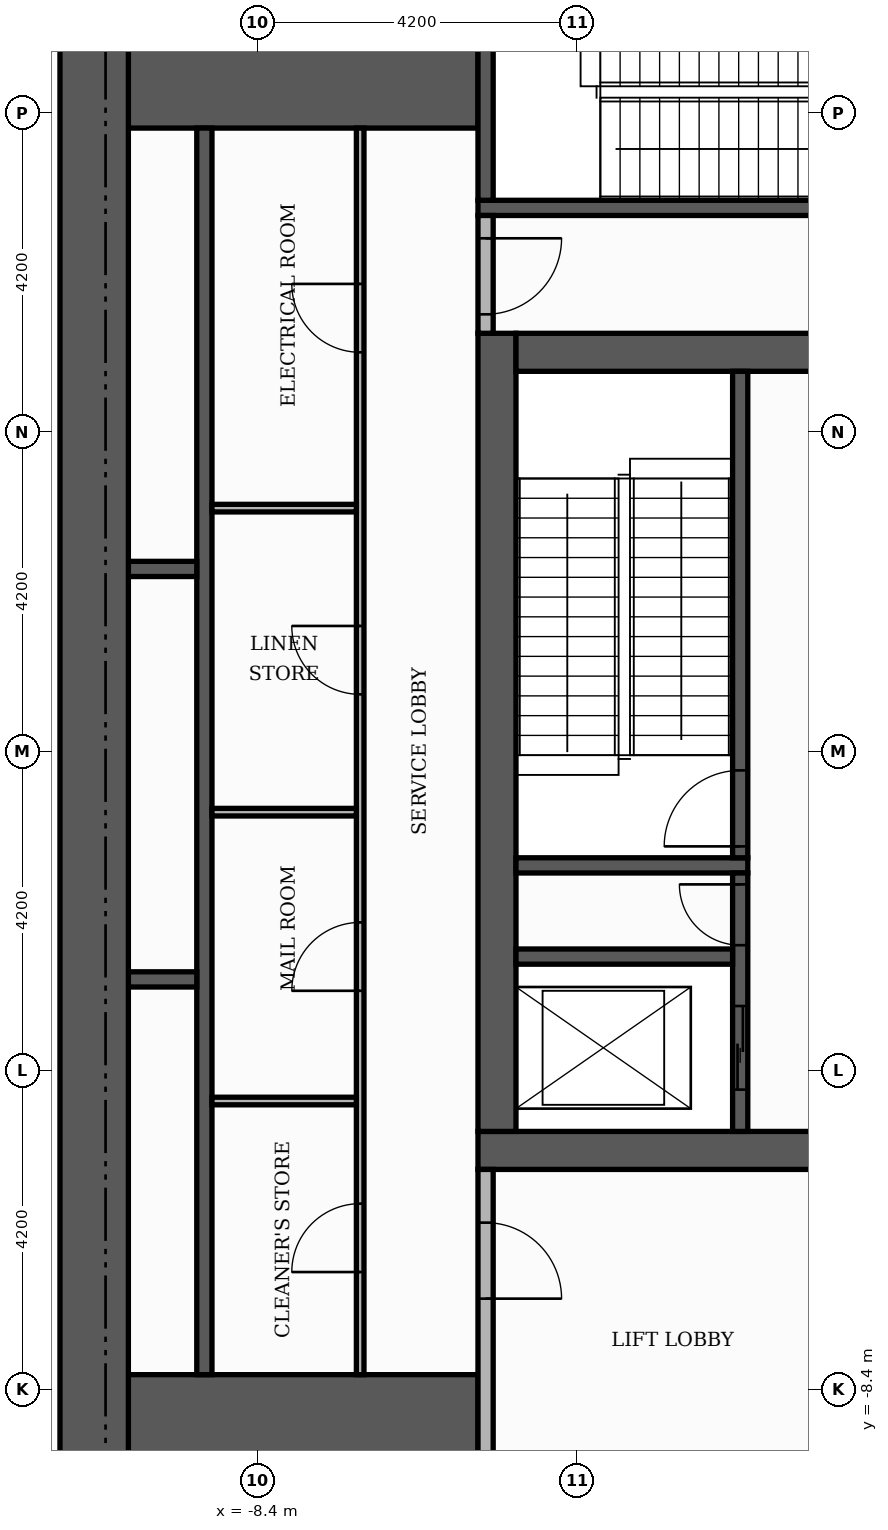
"""IFC4 building model, lengths in metres.
Left out: names, types, materials, properties, quantities, classifications, styles, units other than length and angle.
Written with IfcOpenShell. Run it as: python <this file> out.ifc"""

import sys

from ifc_helpers import new_model, si_unit, direction, frame, frame_2d, origin, place, context, subcontext, project, spatial, rectangle, extrude, element, fill, save


model = new_model("IFC4")
c1 = context("Model", 3, precision=1e-05, world=origin(), true_north=direction((0.0, 1.0)))
c2 = subcontext(c1, "Body", "Model", "MODEL_VIEW")
j1 = project(units=[si_unit("LENGTHUNIT", "METRE"), si_unit("PLANEANGLEUNIT", "RADIAN")], contexts=[c1])
p1 = place(None, origin())
s1 = spatial("IfcSite", under=j1, at=p1, CompositionType="ELEMENT")
p2 = place(p1, origin())
s2 = spatial("IfcBuilding", under=s1, at=p2, CompositionType="ELEMENT")
p3 = place(p2, frame((0.0, 0.0, 235.2)))
s3 = spatial("IfcBuildingStorey", under=s2, at=p3, CompositionType="ELEMENT", Elevation=235.2)
p4 = place(p3, frame((-5.5, -5.25, 0.0), z_axis=(0.0, 0.0, 1.0), x_axis=(1.0, 0.0, 0.0)))
e1 = element("IfcWall", 1, at=p4, inside=s3, PredefinedType="SHEAR", context=c2, shape_type="SweptSolid", body=[
    extrude(rectangle(XDim=11.0, YDim=0.5, at=frame_2d((5.5, 0.0))), origin(), (0.0, 0.0, 1.0), 4.98),
])
p5 = place(p4, frame((4.9, 0.0, 0.0)))
e2 = element("IfcOpeningElement", 2, at=p5, cuts=e1, PredefinedType="OPENING", context=c2, shape_type="SweptSolid", body=[
    extrude(rectangle(XDim=1.2, YDim=2.1, at=frame_2d((0.6, 1.05))), frame((0.0, 0.26, 0.0), z_axis=(0.0, -1.0, 0.0), x_axis=(1.0, 0.0, 0.0)), (0.0, 0.0, 1.0), 0.52),
])
p6 = place(p3, frame((-5.25, -5.0, 0.0), z_axis=(0.0, 0.0, 1.0), x_axis=(0.0, 1.0, 0.0)))
e3 = element("IfcWall", 3, at=p6, inside=s3, PredefinedType="SHEAR", context=c2, shape_type="SweptSolid", body=[
    extrude(rectangle(XDim=10.5, YDim=0.5, at=frame_2d((5.25, 0.0))), origin(), (0.0, 0.0, 1.0), 4.98),
])
p7 = place(p3, frame((-5.0, 5.25, 0.0), z_axis=(0.0, 0.0, 1.0), x_axis=(1.0, 0.0, 0.0)))
e4 = element("IfcWall", 4, at=p7, inside=s3, PredefinedType="SHEAR", context=c2, shape_type="SweptSolid", body=[
    extrude(rectangle(XDim=10.0, YDim=0.5, at=frame_2d((5.0, 0.0))), origin(), (0.0, 0.0, 1.0), 4.98),
])
p8 = place(p7, frame((4.4, 0.0, 0.0)))
e5 = element("IfcOpeningElement", 5, at=p8, cuts=e4, PredefinedType="OPENING", context=c2, shape_type="SweptSolid", body=[
    extrude(rectangle(XDim=1.2, YDim=2.1, at=frame_2d((0.6, 1.05))), frame((0.0, 0.26, 0.0), z_axis=(0.0, -1.0, 0.0), x_axis=(1.0, 0.0, 0.0)), (0.0, 0.0, 1.0), 0.52),
])
for number, where, z_axis, x_axis in (
    (6, (-10.1, -9.15, 0.0), (0.0, 0.0, 1.0), (1.0, 0.0, 0.0)),
    (7, (-10.1, 9.15, 0.0), (0.0, 0.0, 1.0), (1.0, 0.0, 0.0)),
):
    element("IfcWall", number, at=place(p3, frame(where, z_axis=z_axis, x_axis=x_axis)), inside=s3, PredefinedType="SHEAR", context=c2, shape_type="SweptSolid", body=[
        extrude(rectangle(XDim=4.6, YDim=1.9, at=frame_2d((2.3, 0.0))), origin(), (0.0, 0.0, 1.0), 4.98),
    ])
p9 = place(p3, frame((-5.0, -1.5, 0.0), z_axis=(0.0, 0.0, 1.0), x_axis=(1.0, 0.0, 0.0)))
e8 = element("IfcWall", 8, at=p9, inside=s3, PredefinedType="SHEAR", context=c2, shape_type="SweptSolid", body=[
    extrude(rectangle(XDim=3.05, YDim=0.2, at=frame_2d((1.525, 0.0))), origin(), (0.0, 0.0, 1.0), 4.98),
])
p10 = place(p3, frame((-2.05, -1.4, 0.0), z_axis=(0.0, 0.0, 1.0), x_axis=(0.0, 1.0, 0.0)))
e9 = element("IfcWall", 9, at=p10, inside=s3, PredefinedType="SHEAR", context=c2, shape_type="SweptSolid", body=[
    extrude(rectangle(XDim=6.4, YDim=0.2, at=frame_2d((3.2, 0.0))), origin(), (0.0, 0.0, 1.0), 4.98),
])
p11 = place(p10, frame((0.15, 0.0, 0.0)))
e10 = element("IfcOpeningElement", 10, at=p11, cuts=e9, PredefinedType="OPENING", context=c2, shape_type="SweptSolid", body=[
    extrude(rectangle(XDim=1.0, YDim=2.1, at=frame_2d((0.5, 1.05))), frame((0.0, 0.11, 0.0), z_axis=(0.0, -1.0, 0.0), x_axis=(1.0, 0.0, 0.0)), (0.0, 0.0, 1.0), 0.22),
])
p12 = place(p3, frame((-5.5, 7.15, 0.0), z_axis=(0.0, 0.0, 1.0), x_axis=(1.0, 0.0, 0.0)))
e11 = element("IfcWall", 11, at=p12, inside=s3, PredefinedType="SHEAR", context=c2, shape_type="SweptSolid", body=[
    extrude(rectangle(XDim=6.8, YDim=0.2, at=frame_2d((3.4, 0.0))), origin(), (0.0, 0.0, 1.0), 4.98),
])
p13 = place(p3, frame((-5.4, 7.25, 0.0), z_axis=(0.0, 0.0, 1.0), x_axis=(0.0, 1.0, 0.0)))
e12 = element("IfcWall", 12, at=p13, inside=s3, PredefinedType="SHEAR", context=c2, shape_type="SweptSolid", body=[
    extrude(rectangle(XDim=2.85, YDim=0.2, at=frame_2d((1.425, 0.0))), origin(), (0.0, 0.0, 1.0), 4.98),
])
p14 = place(p3, frame((-9.1, -8.2, 0.0), z_axis=(0.0, 0.0, 1.0), x_axis=(0.0, 1.0, 0.0)))
e13 = element("IfcWall", 13, at=p14, inside=s3, PredefinedType="SHEAR", context=c2, shape_type="SweptSolid", body=[
    extrude(rectangle(XDim=16.4, YDim=0.2, at=frame_2d((8.2, 0.0))), origin(), (0.0, 0.0, 1.0), 4.98),
])
p15 = place(p3, frame((-2.05, -5.0, 0.0), z_axis=(0.0, 0.0, 1.0), x_axis=(0.0, 1.0, 0.0)))
e14 = element("IfcWall", 14, at=p15, inside=s3, PredefinedType="SHEAR", context=c2, shape_type="SweptSolid", body=[
    extrude(rectangle(XDim=3.4, YDim=0.2, at=frame_2d((1.7, 0.0))), origin(), (0.0, 0.0, 1.0), 4.98),
])
p16 = place(p15, frame((0.55, 0.0, 0.0)))
e15 = element("IfcOpeningElement", 15, at=p16, cuts=e14, PredefinedType="OPENING", context=c2, shape_type="SweptSolid", body=[
    extrude(rectangle(XDim=1.1, YDim=2.1, at=frame_2d((0.55, 1.05))), frame((0.0, 0.11, 0.0), z_axis=(0.0, -1.0, 0.0), x_axis=(1.0, 0.0, 0.0)), (0.0, 0.0, 1.0), 0.22),
])
p17 = place(p15, frame((2.45, 0.0, 0.0)))
e16 = element("IfcOpeningElement", 16, at=p17, cuts=e14, PredefinedType="OPENING", context=c2, shape_type="SweptSolid", body=[
    extrude(rectangle(XDim=0.8, YDim=2.1, at=frame_2d((0.4, 1.05))), frame((0.0, 0.11, 0.0), z_axis=(0.0, -1.0, 0.0), x_axis=(1.0, 0.0, 0.0)), (0.0, 0.0, 1.0), 0.22),
])
p18 = place(p3, frame((-10.1, -3.0, 0.0), z_axis=(0.0, 0.0, 1.0), x_axis=(1.0, 0.0, 0.0)))
e17 = element("IfcWall", 17, at=p18, inside=s3, PredefinedType="SHEAR", context=c2, shape_type="SweptSolid", body=[
    extrude(rectangle(XDim=0.9, YDim=0.2, at=frame_2d((0.45, 0.0))), origin(), (0.0, 0.0, 1.0), 4.98),
])
p19 = place(p3, frame((-5.0, -2.7, 0.0), z_axis=(0.0, 0.0, 1.0), x_axis=(1.0, 0.0, 0.0)))
e18 = element("IfcWall", 18, at=p19, inside=s3, PredefinedType="SHEAR", context=c2, shape_type="SweptSolid", body=[
    extrude(rectangle(XDim=2.85, YDim=0.2, at=frame_2d((1.425, 0.0))), origin(), (0.0, 0.0, 1.0), 4.98),
])
p20 = place(p3, frame((-10.1, 2.4, 0.0), z_axis=(0.0, 0.0, 1.0), x_axis=(1.0, 0.0, 0.0)))
e19 = element("IfcWall", 19, at=p20, inside=s3, PredefinedType="SHEAR", context=c2, shape_type="SweptSolid", body=[
    extrude(rectangle(XDim=0.9, YDim=0.2, at=frame_2d((0.45, 0.0))), origin(), (0.0, 0.0, 1.0), 4.98),
])
p21 = place(p3, frame((-10.55, -10.1, 0.0), z_axis=(0.0, 0.0, 1.0), x_axis=(0.0, 1.0, 0.0)))
e20 = element("IfcWall", 20, at=p21, inside=s3, PredefinedType="SHEAR", context=c2, shape_type="SweptSolid", body=[
    extrude(rectangle(XDim=20.2, YDim=0.9, at=frame_2d((10.1, 0.0))), origin(), (0.0, 0.0, 1.0), 4.98),
])
p22 = place(p3, frame((-5.4, -10.1, 0.0), z_axis=(0.0, 0.0, 1.0), x_axis=(0.0, 1.0, 0.0)))
e21 = element("IfcWall", 21, at=p22, inside=s3, PredefinedType="PARTITIONING", context=c2, shape_type="SweptSolid", body=[
    extrude(rectangle(XDim=4.6, YDim=0.2, at=frame_2d((2.3, 0.0))), origin(), (0.0, 0.0, 1.0), 4.98),
])
p23 = place(p22, frame((2.9, 0.0, 0.0)))
e22 = element("IfcOpeningElement", 22, at=p23, cuts=e21, PredefinedType="OPENING", context=c2, shape_type="SweptSolid", body=[
    extrude(rectangle(XDim=1.0, YDim=2.1, at=frame_2d((0.5, 1.05))), frame((0.0, 0.11, 0.0), z_axis=(0.0, -1.0, 0.0), x_axis=(1.0, 0.0, 0.0)), (0.0, 0.0, 1.0), 0.22),
])
p24 = place(p3, frame((-7.05, -8.2, 0.0), z_axis=(0.0, 0.0, 1.0), x_axis=(0.0, 1.0, 0.0)))
e23 = element("IfcWall", 23, at=p24, inside=s3, PredefinedType="PARTITIONING", context=c2, shape_type="SweptSolid", body=[
    extrude(rectangle(XDim=16.4, YDim=0.1, at=frame_2d((8.2, 0.0))), origin(), (0.0, 0.0, 1.0), 4.98),
])
p25 = place(p24, frame((1.35, 0.0, 0.0)))
e24 = element("IfcOpeningElement", 24, at=p25, cuts=e23, PredefinedType="OPENING", context=c2, shape_type="SweptSolid", body=[
    extrude(rectangle(XDim=0.9, YDim=2.1, at=frame_2d((0.45, 1.05))), frame((0.0, 0.06, 0.0), z_axis=(0.0, -1.0, 0.0), x_axis=(1.0, 0.0, 0.0)), (0.0, 0.0, 1.0), 0.12),
])
p26 = place(p24, frame((5.05, 0.0, 0.0)))
e25 = element("IfcOpeningElement", 25, at=p26, cuts=e23, PredefinedType="OPENING", context=c2, shape_type="SweptSolid", body=[
    extrude(rectangle(XDim=0.9, YDim=2.1, at=frame_2d((0.45, 1.05))), frame((0.0, 0.06, 0.0), z_axis=(0.0, -1.0, 0.0), x_axis=(1.0, 0.0, 0.0)), (0.0, 0.0, 1.0), 0.12),
])
p27 = place(p24, frame((8.95, 0.0, 0.0)))
e26 = element("IfcOpeningElement", 26, at=p27, cuts=e23, PredefinedType="OPENING", context=c2, shape_type="SweptSolid", body=[
    extrude(rectangle(XDim=0.9, YDim=2.1, at=frame_2d((0.45, 1.05))), frame((0.0, 0.06, 0.0), z_axis=(0.0, -1.0, 0.0), x_axis=(1.0, 0.0, 0.0)), (0.0, 0.0, 1.0), 0.12),
])
p28 = place(p24, frame((13.45, 0.0, 0.0)))
e27 = element("IfcOpeningElement", 27, at=p28, cuts=e23, PredefinedType="OPENING", context=c2, shape_type="SweptSolid", body=[
    extrude(rectangle(XDim=0.9, YDim=2.1, at=frame_2d((0.45, 1.05))), frame((0.0, 0.06, 0.0), z_axis=(0.0, -1.0, 0.0), x_axis=(1.0, 0.0, 0.0)), (0.0, 0.0, 1.0), 0.12),
])
for number, where, z_axis, x_axis in (
    (28, (-9.0, -4.6, 0.0), (0.0, 0.0, 1.0), (1.0, 0.0, 0.0)),
    (29, (-9.0, -0.8, 0.0), (0.0, 0.0, 1.0), (1.0, 0.0, 0.0)),
    (30, (-9.0, 3.2, 0.0), (0.0, 0.0, 1.0), (1.0, 0.0, 0.0)),
):
    element("IfcWall", number, at=place(p3, frame(where, z_axis=z_axis, x_axis=x_axis)), inside=s3, PredefinedType="PARTITIONING", context=c2, shape_type="SweptSolid", body=[
        extrude(rectangle(XDim=1.9, YDim=0.1, at=frame_2d((0.95, 0.0))), origin(), (0.0, 0.0, 1.0), 4.98),
    ])
p29 = place(p3, frame((-5.4, 5.5, 0.0), z_axis=(0.0, 0.0, 1.0), x_axis=(0.0, 1.0, 0.0)))
e31 = element("IfcWall", 31, at=p29, inside=s3, PredefinedType="PARTITIONING", context=c2, shape_type="SweptSolid", body=[
    extrude(rectangle(XDim=1.55, YDim=0.2, at=frame_2d((0.775, 0.0))), origin(), (0.0, 0.0, 1.0), 4.98),
])
p30 = place(p29, frame((0.25, 0.0, 0.0)))
e32 = element("IfcOpeningElement", 32, at=p30, cuts=e31, PredefinedType="OPENING", context=c2, shape_type="SweptSolid", body=[
    extrude(rectangle(XDim=1.0, YDim=2.1, at=frame_2d((0.5, 1.05))), frame((0.0, 0.11, 0.0), z_axis=(0.0, -1.0, 0.0), x_axis=(1.0, 0.0, 0.0)), (0.0, 0.0, 1.0), 0.22),
])
p31 = place(p16, origin())
e33 = element("IfcDoor", 33, at=p31, inside=s3, OperationType="SLIDING_TO_LEFT", PredefinedType="DOOR", context=c2, shape_type="SweptSolid", body=[
    extrude(rectangle(XDim=1.1, YDim=2.1, at=frame_2d((0.55, 1.05))), frame((0.0, 0.025, 0.0), z_axis=(0.0, -1.0, 0.0), x_axis=(1.0, 0.0, 0.0)), (0.0, 0.0, 1.0), 0.05),
])
fill(e15, e33)
p32 = place(p11, origin())
e34 = element("IfcDoor", 34, at=p32, inside=s3, OperationType="SINGLE_SWING_LEFT", PredefinedType="DOOR", context=c2, shape_type="SweptSolid", body=[
    extrude(rectangle(XDim=1.0, YDim=2.1, at=frame_2d((0.5, 1.05))), frame((0.0, 0.025, 0.0), z_axis=(0.0, -1.0, 0.0), x_axis=(1.0, 0.0, 0.0)), (0.0, 0.0, 1.0), 0.05),
])
fill(e10, e34)
p33 = place(p17, origin())
e35 = element("IfcDoor", 35, at=p33, inside=s3, OperationType="SINGLE_SWING_RIGHT", PredefinedType="DOOR", context=c2, shape_type="SweptSolid", body=[
    extrude(rectangle(XDim=0.8, YDim=2.1, at=frame_2d((0.4, 1.05))), frame((0.0, 0.025, 0.0), z_axis=(0.0, -1.0, 0.0), x_axis=(1.0, 0.0, 0.0)), (0.0, 0.0, 1.0), 0.05),
])
fill(e16, e35)
p34 = place(p30, frame((1.0, 0.0, 0.0), z_axis=(0.0, 0.0, 1.0), x_axis=(-1.0, 0.0, 0.0)))
e36 = element("IfcDoor", 36, at=p34, inside=s3, OperationType="SINGLE_SWING_RIGHT", PredefinedType="DOOR", context=c2, shape_type="SweptSolid", body=[
    extrude(rectangle(XDim=1.0, YDim=2.1, at=frame_2d((0.5, 1.05))), frame((0.0, 0.025, 0.0), z_axis=(0.0, -1.0, 0.0), x_axis=(1.0, 0.0, 0.0)), (0.0, 0.0, 1.0), 0.05),
])
fill(e32, e36)
p35 = place(p23, frame((1.0, 0.0, 0.0), z_axis=(0.0, 0.0, 1.0), x_axis=(-1.0, 0.0, 0.0)))
e37 = element("IfcDoor", 37, at=p35, inside=s3, OperationType="SINGLE_SWING_LEFT", PredefinedType="DOOR", context=c2, shape_type="SweptSolid", body=[
    extrude(rectangle(XDim=1.0, YDim=2.1, at=frame_2d((0.5, 1.05))), frame((0.0, 0.025, 0.0), z_axis=(0.0, -1.0, 0.0), x_axis=(1.0, 0.0, 0.0)), (0.0, 0.0, 1.0), 0.05),
])
fill(e22, e37)
p36 = place(p25, origin())
e38 = element("IfcDoor", 38, at=p36, inside=s3, OperationType="SINGLE_SWING_LEFT", PredefinedType="DOOR", context=c2, shape_type="SweptSolid", body=[
    extrude(rectangle(XDim=0.9, YDim=2.1, at=frame_2d((0.45, 1.05))), frame((0.0, 0.025, 0.0), z_axis=(0.0, -1.0, 0.0), x_axis=(1.0, 0.0, 0.0)), (0.0, 0.0, 1.0), 0.05),
])
fill(e24, e38)
p37 = place(p26, origin())
e39 = element("IfcDoor", 39, at=p37, inside=s3, OperationType="SINGLE_SWING_LEFT", PredefinedType="DOOR", context=c2, shape_type="SweptSolid", body=[
    extrude(rectangle(XDim=0.9, YDim=2.1, at=frame_2d((0.45, 1.05))), frame((0.0, 0.025, 0.0), z_axis=(0.0, -1.0, 0.0), x_axis=(1.0, 0.0, 0.0)), (0.0, 0.0, 1.0), 0.05),
])
fill(e25, e39)
p38 = place(p27, origin())
e40 = element("IfcDoor", 40, at=p38, inside=s3, OperationType="SINGLE_SWING_RIGHT", PredefinedType="DOOR", context=c2, shape_type="SweptSolid", body=[
    extrude(rectangle(XDim=0.9, YDim=2.1, at=frame_2d((0.45, 1.05))), frame((0.0, 0.025, 0.0), z_axis=(0.0, -1.0, 0.0), x_axis=(1.0, 0.0, 0.0)), (0.0, 0.0, 1.0), 0.05),
])
fill(e26, e40)
p39 = place(p28, origin())
e41 = element("IfcDoor", 41, at=p39, inside=s3, OperationType="SINGLE_SWING_RIGHT", PredefinedType="DOOR", context=c2, shape_type="SweptSolid", body=[
    extrude(rectangle(XDim=0.9, YDim=2.1, at=frame_2d((0.45, 1.05))), frame((0.0, 0.025, 0.0), z_axis=(0.0, -1.0, 0.0), x_axis=(1.0, 0.0, 0.0)), (0.0, 0.0, 1.0), 0.05),
])
fill(e27, e41)
save(model, sys.argv[1])
